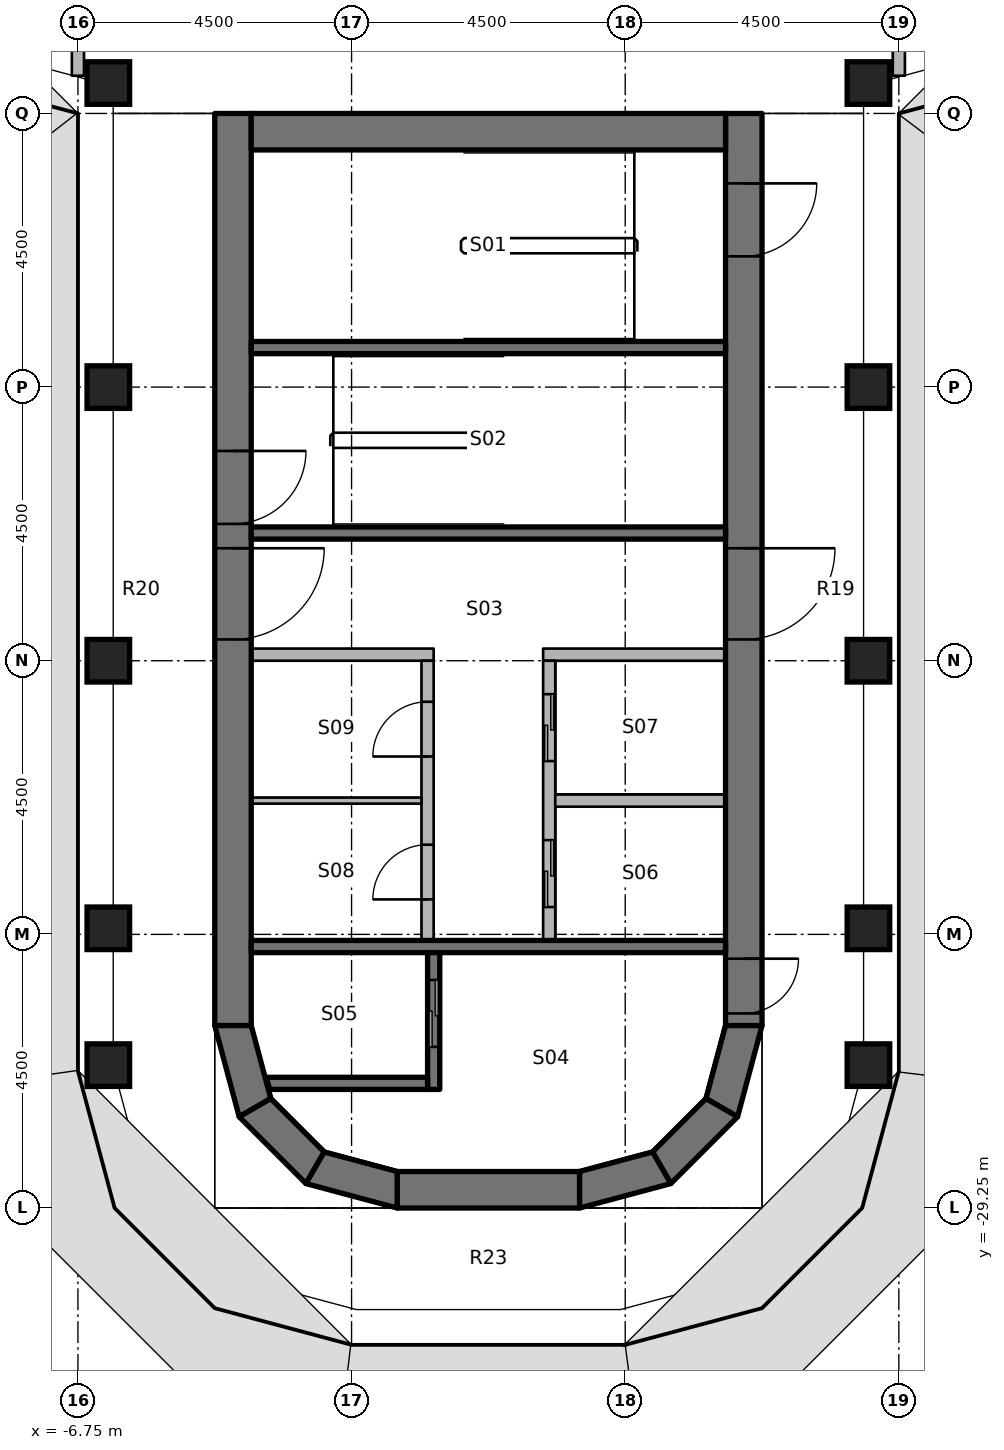
"""IFC4 building model, lengths in metres.
Left out: names, types, materials, properties, quantities, classifications, styles, units other than length and angle.
Written with IfcOpenShell. Run it as: python <this file> out.ifc"""

import sys

from ifc_helpers import new_model, si_unit, direction, frame, frame_2d, origin, origin_2d, place, context, subcontext, project, spatial, polyline, rectangle, outline, extrude, element, fill, save


model = new_model("IFC4")
c1 = context("Model", 3, precision=1e-05, world=origin(), true_north=direction((0.0, 1.0)))
c2 = subcontext(c1, "Body", "Model", "MODEL_VIEW")
j1 = project(units=[si_unit("LENGTHUNIT", "METRE"), si_unit("PLANEANGLEUNIT", "RADIAN")], contexts=[c1])
p1 = place(None, origin())
s1 = spatial("IfcSite", under=j1, at=p1, CompositionType="ELEMENT")
p2 = place(p1, origin())
s2 = spatial("IfcBuilding", under=s1, at=p2, CompositionType="ELEMENT")
p3 = place(p2, frame((0.0, 0.0, 222.0)))
s3 = spatial("IfcBuildingStorey", under=s2, at=p3, CompositionType="ELEMENT", Elevation=222.0)
for number, where, z_axis, x_axis in (
    (1, (-6.25, -26.9, 0.0), (0.0, 0.0, 1.0), (1.0, 0.0, 0.0)),
    (2, (-6.25, -24.65, 0.0), (0.0, 0.0, 1.0), (1.0, 0.0, 0.0)),
    (3, (-6.25, -20.25, 0.0), (0.0, 0.0, 1.0), (1.0, 0.0, 0.0)),
    (4, (-6.25, -15.75, 0.0), (0.0, 0.0, 1.0), (1.0, 0.0, 0.0)),
    (5, (-6.25, -10.75, 0.0), (0.0, 0.0, 1.0), (1.0, 0.0, 0.0)),
    (6, (6.25, -26.9, 0.0), (0.0, 0.0, 1.0), (1.0, 0.0, 0.0)),
    (7, (6.25, -24.65, 0.0), (0.0, 0.0, 1.0), (1.0, 0.0, 0.0)),
    (8, (6.25, -20.25, 0.0), (0.0, 0.0, 1.0), (1.0, 0.0, 0.0)),
    (9, (6.25, -15.75, 0.0), (0.0, 0.0, 1.0), (1.0, 0.0, 0.0)),
    (10, (6.25, -10.75, 0.0), (0.0, 0.0, 1.0), (1.0, 0.0, 0.0)),
):
    element("IfcColumn", number, at=place(p3, frame(where, z_axis=z_axis, x_axis=x_axis)), inside=s3, PredefinedType="COLUMN", context=c2, shape_type="SweptSolid", body=[
        extrude(rectangle(XDim=0.7, YDim=0.7, at=origin_2d()), origin(), (0.0, 0.0, 1.0), 3.65),
    ])
p4 = place(p3, frame((-4.2, -11.25, 0.0), z_axis=(0.0, 0.0, 1.0), x_axis=(0.0, -1.0, 0.0)))
e11 = element("IfcWall", 11, at=p4, inside=s3, PredefinedType="SHEAR", context=c2, shape_type="SweptSolid", body=[
    extrude(rectangle(XDim=15.0, YDim=0.6, at=frame_2d((7.5, 0.0))), origin(), (0.0, 0.0, 1.0), 3.8),
])
p5 = place(p4, frame((7.15, 0.0, 0.0)))
e12 = element("IfcOpeningElement", 12, at=p5, cuts=e11, PredefinedType="OPENING", context=c2, shape_type="SweptSolid", body=[
    extrude(rectangle(XDim=1.5, YDim=2.3, at=frame_2d((0.75, 1.15))), frame((0.0, 0.31, 0.0), z_axis=(0.0, -1.0, 0.0), x_axis=(1.0, 0.0, 0.0)), (0.0, 0.0, 1.0), 0.62),
])
p6 = place(p4, frame((5.55, 0.0, 0.0)))
e13 = element("IfcOpeningElement", 13, at=p6, cuts=e11, PredefinedType="OPENING", context=c2, shape_type="SweptSolid", body=[
    extrude(rectangle(XDim=1.2, YDim=2.1, at=frame_2d((0.6, 1.05))), frame((0.0, 0.31, 0.0), z_axis=(0.0, -1.0, 0.0), x_axis=(1.0, 0.0, 0.0)), (0.0, 0.0, 1.0), 0.62),
])
p7 = place(p3, frame((4.2, -11.25, 0.0), z_axis=(0.0, 0.0, 1.0), x_axis=(0.0, -1.0, 0.0)))
e14 = element("IfcWall", 14, at=p7, inside=s3, PredefinedType="SHEAR", context=c2, shape_type="SweptSolid", body=[
    extrude(rectangle(XDim=15.0, YDim=0.6, at=frame_2d((7.5, 0.0))), origin(), (0.0, 0.0, 1.0), 3.8),
])
p8 = place(p7, frame((7.15, 0.0, 0.0)))
e15 = element("IfcOpeningElement", 15, at=p8, cuts=e14, PredefinedType="OPENING", context=c2, shape_type="SweptSolid", body=[
    extrude(rectangle(XDim=1.5, YDim=2.3, at=frame_2d((0.75, 1.15))), frame((0.0, 0.31, 0.0), z_axis=(0.0, -1.0, 0.0), x_axis=(1.0, 0.0, 0.0)), (0.0, 0.0, 1.0), 0.62),
])
p9 = place(p7, frame((13.9, 0.0, 0.0)))
e16 = element("IfcOpeningElement", 16, at=p9, cuts=e14, PredefinedType="OPENING", context=c2, shape_type="SweptSolid", body=[
    extrude(rectangle(XDim=0.9, YDim=2.1, at=frame_2d((0.45, 1.05))), frame((0.0, 0.31, 0.0), z_axis=(0.0, -1.0, 0.0), x_axis=(1.0, 0.0, 0.0)), (0.0, 0.0, 1.0), 0.62),
])
p10 = place(p7, frame((1.15, 0.0, 0.0)))
e17 = element("IfcOpeningElement", 17, at=p10, cuts=e14, PredefinedType="OPENING", context=c2, shape_type="SweptSolid", body=[
    extrude(rectangle(XDim=1.2, YDim=2.1, at=frame_2d((0.6, 1.05))), frame((0.0, 0.31, 0.0), z_axis=(0.0, -1.0, 0.0), x_axis=(1.0, 0.0, 0.0)), (0.0, 0.0, 1.0), 0.62),
])
p11 = place(p3, frame((-3.9, -11.55, 0.0), z_axis=(0.0, 0.0, 1.0), x_axis=(1.0, 0.0, 0.0)))
e18 = element("IfcWall", 18, at=p11, inside=s3, PredefinedType="SHEAR", context=c2, shape_type="SweptSolid", body=[
    extrude(rectangle(XDim=7.8, YDim=0.6, at=frame_2d((3.9, 0.0))), origin(), (0.0, 0.0, 1.0), 3.8),
])
p12 = place(p3, frame((-1.5, -28.95, 0.0), z_axis=(0.0, 0.0, 1.0), x_axis=(1.0, 0.0, 0.0)))
e19 = element("IfcWall", 19, at=p12, inside=s3, PredefinedType="SHEAR", context=c2, shape_type="SweptSolid", body=[
    extrude(rectangle(XDim=3.0, YDim=0.6, at=frame_2d((1.5, 0.0))), origin(), (0.0, 0.0, 1.0), 3.8),
])
p13 = place(p3, origin())
e20 = element("IfcWall", 20, at=p13, inside=s3, PredefinedType="SHEAR", context=c2, shape_type="SweptSolid", body=[
    extrude(outline(polyline([(-4.5, -26.25), (-4.098, -27.75), (-3.579, -27.45), (-3.9, -26.25), (-4.5, -26.25)])), origin(), (0.0, 0.0, 1.0), 3.8),
])
p14 = place(p3, origin())
e21 = element("IfcWall", 21, at=p14, inside=s3, PredefinedType="SHEAR", context=c2, shape_type="SweptSolid", body=[
    extrude(outline(polyline([(-4.098, -27.75), (-3.0, -28.848), (-2.7, -28.329), (-3.579, -27.45), (-4.098, -27.75)])), origin(), (0.0, 0.0, 1.0), 3.8),
])
p15 = place(p3, origin())
e22 = element("IfcWall", 22, at=p15, inside=s3, PredefinedType="SHEAR", context=c2, shape_type="SweptSolid", body=[
    extrude(outline(polyline([(-3.0, -28.848), (-1.5, -29.25), (-1.5, -28.65), (-2.7, -28.329), (-3.0, -28.848)])), origin(), (0.0, 0.0, 1.0), 3.8),
])
p16 = place(p3, origin())
e23 = element("IfcWall", 23, at=p16, inside=s3, PredefinedType="SHEAR", context=c2, shape_type="SweptSolid", body=[
    extrude(outline(polyline([(4.5, -26.25), (4.098, -27.75), (3.579, -27.45), (3.9, -26.25), (4.5, -26.25)])), origin(), (0.0, 0.0, 1.0), 3.8),
])
p17 = place(p3, origin())
e24 = element("IfcWall", 24, at=p17, inside=s3, PredefinedType="SHEAR", context=c2, shape_type="SweptSolid", body=[
    extrude(outline(polyline([(4.098, -27.75), (3.0, -28.848), (2.7, -28.329), (3.579, -27.45), (4.098, -27.75)])), origin(), (0.0, 0.0, 1.0), 3.8),
])
p18 = place(p3, origin())
e25 = element("IfcWall", 25, at=p18, inside=s3, PredefinedType="SHEAR", context=c2, shape_type="SweptSolid", body=[
    extrude(outline(polyline([(3.0, -28.848), (1.5, -29.25), (1.5, -28.65), (2.7, -28.329), (3.0, -28.848)])), origin(), (0.0, 0.0, 1.0), 3.8),
])
p19 = place(p3, frame((3.9, -24.95, 0.0), z_axis=(0.0, 0.0, 1.0), x_axis=(-1.0, 0.0, 0.0)))
e26 = element("IfcWall", 26, at=p19, inside=s3, PredefinedType="SHEAR", context=c2, shape_type="SweptSolid", body=[
    extrude(rectangle(XDim=7.8, YDim=0.2, at=frame_2d((3.9, 0.0))), origin(), (0.0, 0.0, 1.0), 3.65),
])
p20 = place(p3, frame((-0.9, -27.3, 0.0), z_axis=(0.0, 0.0, 1.0), x_axis=(0.0, 1.0, 0.0)))
e27 = element("IfcWall", 27, at=p20, inside=s3, PredefinedType="SHEAR", context=c2, shape_type="SweptSolid", body=[
    extrude(rectangle(XDim=2.25, YDim=0.2, at=frame_2d((1.125, 0.0))), origin(), (0.0, 0.0, 1.0), 3.65),
])
p21 = place(p20, frame((0.7, 0.0, 0.0)))
e28 = element("IfcOpeningElement", 28, at=p21, cuts=e27, PredefinedType="OPENING", context=c2, shape_type="SweptSolid", body=[
    extrude(rectangle(XDim=1.1, YDim=2.3, at=frame_2d((0.55, 1.15))), frame((0.0, 0.11, 0.0), z_axis=(0.0, -1.0, 0.0), x_axis=(1.0, 0.0, 0.0)), (0.0, 0.0, 1.0), 0.22),
])
p22 = place(p3, origin())
e29 = element("IfcWall", 29, at=p22, inside=s3, PredefinedType="SHEAR", context=c2, shape_type="SweptSolid", body=[
    extrude(outline(polyline([(-1.0, -27.1), (-3.651, -27.1), (-3.597, -27.3), (-1.0, -27.3), (-1.0, -27.1)])), origin(), (0.0, 0.0, 1.0), 3.65),
])
for number, where, z_axis, x_axis in (
    (30, (3.9, -18.15, 0.0), (0.0, 0.0, 1.0), (-1.0, 0.0, 0.0)),
    (31, (3.9, -15.1, 0.0), (0.0, 0.0, 1.0), (-1.0, 0.0, 0.0)),
):
    element("IfcWall", number, at=place(p3, frame(where, z_axis=z_axis, x_axis=x_axis)), inside=s3, PredefinedType="SHEAR", context=c2, shape_type="SweptSolid", body=[
        extrude(rectangle(XDim=7.8, YDim=0.2, at=frame_2d((3.9, 0.0))), origin(), (0.0, 0.0, 1.0), 3.65),
    ])
p23 = place(p3, frame((3.9, -20.15, 0.0), z_axis=(0.0, 0.0, 1.0), x_axis=(-1.0, 0.0, 0.0)))
e32 = element("IfcWall", 32, at=p23, inside=s3, PredefinedType="PARTITIONING", context=c2, shape_type="SweptSolid", body=[
    extrude(rectangle(XDim=3.0, YDim=0.2, at=frame_2d((1.5, 0.0))), origin(), (0.0, 0.0, 1.0), 3.65),
])
p24 = place(p3, frame((1.0, -24.85, 0.0), z_axis=(0.0, 0.0, 1.0), x_axis=(0.0, 1.0, 0.0)))
e33 = element("IfcWall", 33, at=p24, inside=s3, PredefinedType="PARTITIONING", context=c2, shape_type="SweptSolid", body=[
    extrude(rectangle(XDim=4.6, YDim=0.2, at=frame_2d((2.3, 0.0))), origin(), (0.0, 0.0, 1.0), 3.65),
])
p25 = place(p24, frame((0.55, 0.0, 0.0)))
e34 = element("IfcOpeningElement", 34, at=p25, cuts=e33, PredefinedType="OPENING", context=c2, shape_type="SweptSolid", body=[
    extrude(rectangle(XDim=1.1, YDim=2.3, at=frame_2d((0.55, 1.15))), frame((0.0, 0.11, 0.0), z_axis=(0.0, -1.0, 0.0), x_axis=(1.0, 0.0, 0.0)), (0.0, 0.0, 1.0), 0.22),
])
p26 = place(p24, frame((2.95, 0.0, 0.0)))
e35 = element("IfcOpeningElement", 35, at=p26, cuts=e33, PredefinedType="OPENING", context=c2, shape_type="SweptSolid", body=[
    extrude(rectangle(XDim=1.1, YDim=2.3, at=frame_2d((0.55, 1.15))), frame((0.0, 0.11, 0.0), z_axis=(0.0, -1.0, 0.0), x_axis=(1.0, 0.0, 0.0)), (0.0, 0.0, 1.0), 0.22),
])
p27 = place(p3, frame((-0.9, -20.15, 0.0), z_axis=(0.0, 0.0, 1.0), x_axis=(-1.0, 0.0, 0.0)))
e36 = element("IfcWall", 36, at=p27, inside=s3, PredefinedType="PARTITIONING", context=c2, shape_type="SweptSolid", body=[
    extrude(rectangle(XDim=3.0, YDim=0.2, at=frame_2d((1.5, 0.0))), origin(), (0.0, 0.0, 1.0), 3.65),
])
p28 = place(p3, frame((-1.0, -24.85, 0.0), z_axis=(0.0, 0.0, 1.0), x_axis=(0.0, 1.0, 0.0)))
e37 = element("IfcWall", 37, at=p28, inside=s3, PredefinedType="PARTITIONING", context=c2, shape_type="SweptSolid", body=[
    extrude(rectangle(XDim=4.6, YDim=0.2, at=frame_2d((2.3, 0.0))), origin(), (0.0, 0.0, 1.0), 3.65),
])
p29 = place(p28, frame((0.675, 0.0, 0.0)))
e38 = element("IfcOpeningElement", 38, at=p29, cuts=e37, PredefinedType="OPENING", context=c2, shape_type="SweptSolid", body=[
    extrude(rectangle(XDim=0.9, YDim=2.1, at=frame_2d((0.45, 1.05))), frame((0.0, 0.11, 0.0), z_axis=(0.0, -1.0, 0.0), x_axis=(1.0, 0.0, 0.0)), (0.0, 0.0, 1.0), 0.22),
])
p30 = place(p28, frame((3.025, 0.0, 0.0)))
e39 = element("IfcOpeningElement", 39, at=p30, cuts=e37, PredefinedType="OPENING", context=c2, shape_type="SweptSolid", body=[
    extrude(rectangle(XDim=0.9, YDim=2.1, at=frame_2d((0.45, 1.05))), frame((0.0, 0.11, 0.0), z_axis=(0.0, -1.0, 0.0), x_axis=(1.0, 0.0, 0.0)), (0.0, 0.0, 1.0), 0.22),
])
p31 = place(p3, frame((3.9, -22.55, 0.0), z_axis=(0.0, 0.0, 1.0), x_axis=(-1.0, 0.0, 0.0)))
e40 = element("IfcWall", 40, at=p31, inside=s3, PredefinedType="PARTITIONING", context=c2, shape_type="SweptSolid", body=[
    extrude(rectangle(XDim=2.8, YDim=0.2, at=frame_2d((1.4, 0.0))), origin(), (0.0, 0.0, 1.0), 3.65),
])
p32 = place(p3, frame((-1.1, -22.55, 0.0), z_axis=(0.0, 0.0, 1.0), x_axis=(-1.0, 0.0, 0.0)))
e41 = element("IfcWall", 41, at=p32, inside=s3, PredefinedType="PARTITIONING", context=c2, shape_type="SweptSolid", body=[
    extrude(rectangle(XDim=2.8, YDim=0.1, at=frame_2d((1.4, 0.0))), origin(), (0.0, 0.0, 1.0), 3.65),
])
for number, where, z_axis, x_axis in (
    (42, (6.75, -10.63, 0.0), (0.0, 0.0, 1.0), (0.0, 1.0, 0.0)),
    (43, (-6.75, -10.63, 0.0), (0.0, 0.0, 1.0), (0.0, 1.0, 0.0)),
):
    element("IfcWall", number, at=place(p3, frame(where, z_axis=z_axis, x_axis=x_axis)), inside=s3, PredefinedType="PARTITIONING", context=c2, shape_type="SweptSolid", body=[
        extrude(rectangle(XDim=3.78, YDim=0.2, at=frame_2d((1.89, 0.0))), origin(), (0.0, 0.0, 1.0), 2.75),
    ])
p33 = place(p8, origin())
e44 = element("IfcDoor", 44, at=p33, inside=s3, OperationType="DOUBLE_DOOR_SINGLE_SWING", PredefinedType="DOOR", context=c2, shape_type="SweptSolid", body=[
    extrude(rectangle(XDim=1.5, YDim=2.3, at=frame_2d((0.75, 1.15))), frame((0.0, 0.025, 0.0), z_axis=(0.0, -1.0, 0.0), x_axis=(1.0, 0.0, 0.0)), (0.0, 0.0, 1.0), 0.05),
])
fill(e15, e44)
p34 = place(p5, origin())
e45 = element("IfcDoor", 45, at=p34, inside=s3, OperationType="DOUBLE_DOOR_SINGLE_SWING", PredefinedType="DOOR", context=c2, shape_type="SweptSolid", body=[
    extrude(rectangle(XDim=1.5, YDim=2.3, at=frame_2d((0.75, 1.15))), frame((0.0, 0.025, 0.0), z_axis=(0.0, -1.0, 0.0), x_axis=(1.0, 0.0, 0.0)), (0.0, 0.0, 1.0), 0.05),
])
fill(e12, e45)
p35 = place(p9, origin())
e46 = element("IfcDoor", 46, at=p35, inside=s3, OperationType="SINGLE_SWING_RIGHT", PredefinedType="DOOR", context=c2, shape_type="SweptSolid", body=[
    extrude(rectangle(XDim=0.9, YDim=2.1, at=frame_2d((0.45, 1.05))), frame((0.0, 0.025, 0.0), z_axis=(0.0, -1.0, 0.0), x_axis=(1.0, 0.0, 0.0)), (0.0, 0.0, 1.0), 0.05),
])
fill(e16, e46)
p36 = place(p6, origin())
e47 = element("IfcDoor", 47, at=p36, inside=s3, OperationType="SINGLE_SWING_RIGHT", PredefinedType="DOOR", context=c2, shape_type="SweptSolid", body=[
    extrude(rectangle(XDim=1.2, YDim=2.1, at=frame_2d((0.6, 1.05))), frame((0.0, 0.025, 0.0), z_axis=(0.0, -1.0, 0.0), x_axis=(1.0, 0.0, 0.0)), (0.0, 0.0, 1.0), 0.05),
])
fill(e13, e47)
p37 = place(p10, origin())
e48 = element("IfcDoor", 48, at=p37, inside=s3, OperationType="SINGLE_SWING_RIGHT", PredefinedType="DOOR", context=c2, shape_type="SweptSolid", body=[
    extrude(rectangle(XDim=1.2, YDim=2.1, at=frame_2d((0.6, 1.05))), frame((0.0, 0.025, 0.0), z_axis=(0.0, -1.0, 0.0), x_axis=(1.0, 0.0, 0.0)), (0.0, 0.0, 1.0), 0.05),
])
fill(e17, e48)
p38 = place(p21, origin())
e49 = element("IfcDoor", 49, at=p38, inside=s3, OperationType="DOUBLE_DOOR_SLIDING", PredefinedType="DOOR", context=c2, shape_type="SweptSolid", body=[
    extrude(rectangle(XDim=1.1, YDim=2.3, at=frame_2d((0.55, 1.15))), frame((0.0, 0.025, 0.0), z_axis=(0.0, -1.0, 0.0), x_axis=(1.0, 0.0, 0.0)), (0.0, 0.0, 1.0), 0.05),
])
fill(e28, e49)
p39 = place(p25, origin())
e50 = element("IfcDoor", 50, at=p39, inside=s3, OperationType="DOUBLE_DOOR_SLIDING", PredefinedType="DOOR", context=c2, shape_type="SweptSolid", body=[
    extrude(rectangle(XDim=1.1, YDim=2.3, at=frame_2d((0.55, 1.15))), frame((0.0, 0.025, 0.0), z_axis=(0.0, -1.0, 0.0), x_axis=(1.0, 0.0, 0.0)), (0.0, 0.0, 1.0), 0.05),
])
fill(e34, e50)
p40 = place(p26, origin())
e51 = element("IfcDoor", 51, at=p40, inside=s3, OperationType="DOUBLE_DOOR_SLIDING", PredefinedType="DOOR", context=c2, shape_type="SweptSolid", body=[
    extrude(rectangle(XDim=1.1, YDim=2.3, at=frame_2d((0.55, 1.15))), frame((0.0, 0.025, 0.0), z_axis=(0.0, -1.0, 0.0), x_axis=(1.0, 0.0, 0.0)), (0.0, 0.0, 1.0), 0.05),
])
fill(e35, e51)
p41 = place(p29, origin())
e52 = element("IfcDoor", 52, at=p41, inside=s3, OperationType="SINGLE_SWING_LEFT", PredefinedType="DOOR", context=c2, shape_type="SweptSolid", body=[
    extrude(rectangle(XDim=0.9, YDim=2.1, at=frame_2d((0.45, 1.05))), frame((0.0, 0.025, 0.0), z_axis=(0.0, -1.0, 0.0), x_axis=(1.0, 0.0, 0.0)), (0.0, 0.0, 1.0), 0.05),
])
fill(e38, e52)
p42 = place(p30, origin())
e53 = element("IfcDoor", 53, at=p42, inside=s3, OperationType="SINGLE_SWING_RIGHT", PredefinedType="DOOR", context=c2, shape_type="SweptSolid", body=[
    extrude(rectangle(XDim=0.9, YDim=2.1, at=frame_2d((0.45, 1.05))), frame((0.0, 0.025, 0.0), z_axis=(0.0, -1.0, 0.0), x_axis=(1.0, 0.0, 0.0)), (0.0, 0.0, 1.0), 0.05),
])
fill(e39, e53)
save(model, sys.argv[1])
